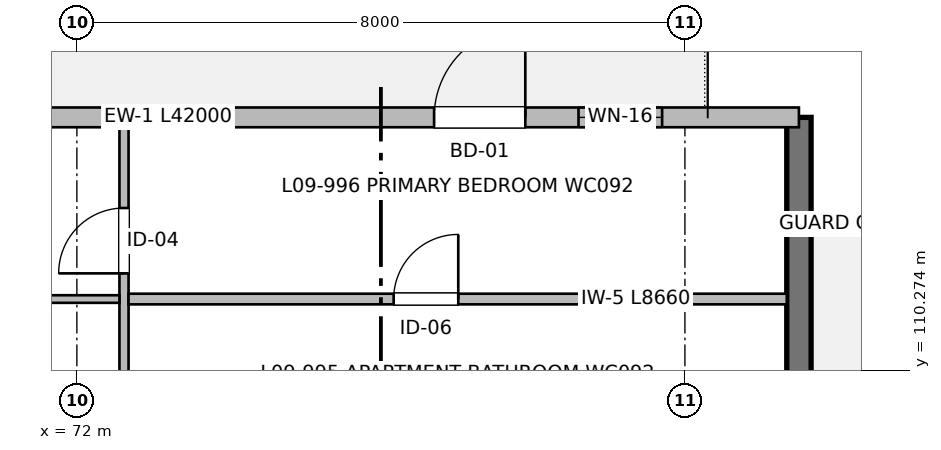
"""IFC4 building model, lengths in metres.
Left out: names, types, materials, properties, quantities, classifications, styles, units other than length and angle.
Written with IfcOpenShell. Run it as: python <this file> out.ifc"""

import sys

from ifc_helpers import new_model, si_unit, direction, frame, frame_2d, origin, place, context, subcontext, project, spatial, rectangle, extrude, element, fill, save


model = new_model("IFC4")
c1 = context("Model", 3, precision=1e-05, world=origin(), true_north=direction((0.0, 1.0)))
c2 = subcontext(c1, "Body", "Model", "MODEL_VIEW")
j1 = project(units=[si_unit("LENGTHUNIT", "METRE"), si_unit("PLANEANGLEUNIT", "RADIAN")], contexts=[c1])
p1 = place(None, origin())
s1 = spatial("IfcSite", under=j1, at=p1, CompositionType="ELEMENT")
p2 = place(p1, origin())
s2 = spatial("IfcBuilding", under=s1, at=p2, CompositionType="ELEMENT")
p3 = place(p2, frame((0.0, 0.0, 29.76)))
s3 = spatial("IfcBuildingStorey", under=s2, at=p3, CompositionType="ELEMENT", Elevation=29.76)
p4 = place(p3, frame((81.5, 113.6, 0.0), z_axis=(0.0, 0.0, 1.0), x_axis=(0.0, -1.0, 0.0)))
e1 = element("IfcWall", 1, at=p4, inside=s3, PredefinedType="SHEAR", context=c2, shape_type="SweptSolid", body=[
    extrude(rectangle(XDim=13.6, YDim=0.32, at=frame_2d((6.8, 0.0))), origin(), (0.0, 0.0, 1.0), 2.98),
])
p5 = place(p4, frame((4.9, 0.0, 0.0)))
e2 = element("IfcOpeningElement", 2, at=p5, cuts=e1, PredefinedType="OPENING", context=c2, shape_type="SweptSolid", body=[
    extrude(rectangle(XDim=1.2, YDim=2.2, at=frame_2d((0.6, 1.1))), frame((0.0, 0.17, 0.0), z_axis=(0.0, -1.0, 0.0), x_axis=(1.0, 0.0, 0.0)), (0.0, 0.0, 1.0), 0.34),
])
p6 = place(p4, frame((8.1, 0.0, 0.72)))
e3 = element("IfcOpeningElement", 3, at=p6, cuts=e1, PredefinedType="OPENING", context=c2, shape_type="SweptSolid", body=[
    extrude(rectangle(XDim=2.25, YDim=1.5, at=frame_2d((1.125, 0.75))), frame((0.0, 0.17, 0.0), z_axis=(0.0, -1.0, 0.0), x_axis=(1.0, 0.0, 0.0)), (0.0, 0.0, 1.0), 0.34),
])
p7 = place(p3, frame((39.5, 113.6, 0.0), z_axis=(0.0, 0.0, 1.0), x_axis=(1.0, 0.0, 0.0)))
e4 = element("IfcWall", 4, at=p7, inside=s3, PredefinedType="SOLIDWALL", context=c2, shape_type="SweptSolid", body=[
    extrude(rectangle(XDim=42.0, YDim=0.26, at=frame_2d((21.0, 0.0))), origin(), (0.0, 0.0, 1.0), 2.98),
])
p8 = place(p7, frame((3.6, 0.0, 0.0)))
e5 = element("IfcOpeningElement", 5, at=p8, cuts=e4, PredefinedType="OPENING", context=c2, shape_type="SweptSolid", body=[
    extrude(rectangle(XDim=1.2, YDim=2.2, at=frame_2d((0.6, 1.1))), frame((0.0, 0.14, 0.0), z_axis=(0.0, -1.0, 0.0), x_axis=(1.0, 0.0, 0.0)), (0.0, 0.0, 1.0), 0.28),
])
p9 = place(p7, frame((5.5, 0.0, 0.72)))
e6 = element("IfcOpeningElement", 6, at=p9, cuts=e4, PredefinedType="OPENING", context=c2, shape_type="SweptSolid", body=[
    extrude(rectangle(XDim=2.25, YDim=1.5, at=frame_2d((1.125, 0.75))), frame((0.0, 0.14, 0.0), z_axis=(0.0, -1.0, 0.0), x_axis=(1.0, 0.0, 0.0)), (0.0, 0.0, 1.0), 0.28),
])
p10 = place(p7, frame((12.45, 0.0, 0.72)))
e7 = element("IfcOpeningElement", 7, at=p10, cuts=e4, PredefinedType="OPENING", context=c2, shape_type="SweptSolid", body=[
    extrude(rectangle(XDim=2.0, YDim=1.5, at=frame_2d((1.0, 0.75))), frame((0.0, 0.14, 0.0), z_axis=(0.0, -1.0, 0.0), x_axis=(1.0, 0.0, 0.0)), (0.0, 0.0, 1.0), 0.28),
])
p11 = place(p7, frame((19.1, 0.0, 0.0)))
e8 = element("IfcOpeningElement", 8, at=p11, cuts=e4, PredefinedType="OPENING", context=c2, shape_type="SweptSolid", body=[
    extrude(rectangle(XDim=1.2, YDim=2.2, at=frame_2d((0.6, 1.1))), frame((0.0, 0.14, 0.0), z_axis=(0.0, -1.0, 0.0), x_axis=(1.0, 0.0, 0.0)), (0.0, 0.0, 1.0), 0.28),
])
p12 = place(p7, frame((22.3, 0.0, 0.9)))
e9 = element("IfcOpeningElement", 9, at=p12, cuts=e4, PredefinedType="OPENING", context=c2, shape_type="SweptSolid", body=[
    extrude(rectangle(XDim=1.2, YDim=1.05, at=frame_2d((0.6, 0.525))), frame((0.0, 0.14, 0.0), z_axis=(0.0, -1.0, 0.0), x_axis=(1.0, 0.0, 0.0)), (0.0, 0.0, 1.0), 0.28),
])
p13 = place(p7, frame((28.6, 0.0, 0.77)))
e10 = element("IfcOpeningElement", 10, at=p13, cuts=e4, PredefinedType="OPENING", context=c2, shape_type="SweptSolid", body=[
    extrude(rectangle(XDim=1.6, YDim=1.45, at=frame_2d((0.8, 0.725))), frame((0.0, 0.14, 0.0), z_axis=(0.0, -1.0, 0.0), x_axis=(1.0, 0.0, 0.0)), (0.0, 0.0, 1.0), 0.28),
])
p14 = place(p7, frame((37.2, 0.0, 0.0)))
e11 = element("IfcOpeningElement", 11, at=p14, cuts=e4, PredefinedType="OPENING", context=c2, shape_type="SweptSolid", body=[
    extrude(rectangle(XDim=1.2, YDim=2.2, at=frame_2d((0.6, 1.1))), frame((0.0, 0.14, 0.0), z_axis=(0.0, -1.0, 0.0), x_axis=(1.0, 0.0, 0.0)), (0.0, 0.0, 1.0), 0.28),
])
p15 = place(p7, frame((39.1, 0.0, 0.62)))
e12 = element("IfcOpeningElement", 12, at=p15, cuts=e4, PredefinedType="OPENING", context=c2, shape_type="SweptSolid", body=[
    extrude(rectangle(XDim=1.1, YDim=1.6, at=frame_2d((0.55, 0.8))), frame((0.0, 0.14, 0.0), z_axis=(0.0, -1.0, 0.0), x_axis=(1.0, 0.0, 0.0)), (0.0, 0.0, 1.0), 0.28),
])
p16 = place(p3, frame((72.62, 109.28, 0.0), z_axis=(0.0, 0.0, 1.0), x_axis=(0.0, 1.0, 0.0)))
e13 = element("IfcWall", 13, at=p16, inside=s3, PredefinedType="PARTITIONING", context=c2, shape_type="SweptSolid", body=[
    extrude(rectangle(XDim=4.19, YDim=0.12, at=frame_2d((2.095, 0.0))), origin(), (0.0, 0.0, 1.0), 2.935),
])
p17 = place(p16, frame((2.268, 0.0, 0.0)))
e14 = element("IfcOpeningElement", 14, at=p17, cuts=e13, PredefinedType="OPENING", context=c2, shape_type="SweptSolid", body=[
    extrude(rectangle(XDim=0.86, YDim=2.1, at=frame_2d((0.43, 1.05))), frame((0.0, 0.07, 0.0), z_axis=(0.0, -1.0, 0.0), x_axis=(1.0, 0.0, 0.0)), (0.0, 0.0, 1.0), 0.14),
])
p18 = place(p3, frame((72.68, 111.21, 0.0), z_axis=(0.0, 0.0, 1.0), x_axis=(1.0, 0.0, 0.0)))
e15 = element("IfcWall", 15, at=p18, inside=s3, PredefinedType="PARTITIONING", context=c2, shape_type="SweptSolid", body=[
    extrude(rectangle(XDim=8.66, YDim=0.14, at=frame_2d((4.33, 0.0))), origin(), (0.0, 0.0, 1.0), 2.935),
])
p19 = place(p18, frame((3.488, 0.0, 0.0)))
e16 = element("IfcOpeningElement", 16, at=p19, cuts=e15, PredefinedType="OPENING", context=c2, shape_type="SweptSolid", body=[
    extrude(rectangle(XDim=0.85, YDim=2.05, at=frame_2d((0.425, 1.025))), frame((0.0, 0.08, 0.0), z_axis=(0.0, -1.0, 0.0), x_axis=(1.0, 0.0, 0.0)), (0.0, 0.0, 1.0), 0.16),
])
p20 = place(p3, frame((60.59, 111.21, 0.0), z_axis=(0.0, 0.0, 1.0), x_axis=(1.0, 0.0, 0.0)))
e17 = element("IfcWall", 17, at=p20, inside=s3, PredefinedType="PARTITIONING", context=c2, shape_type="SweptSolid", body=[
    extrude(rectangle(XDim=11.97, YDim=0.1, at=frame_2d((5.985, 0.0))), origin(), (0.0, 0.0, 1.0), 2.935),
])
p21 = place(p20, frame((4.812, 0.0, 0.0)))
e18 = element("IfcOpeningElement", 18, at=p21, cuts=e17, PredefinedType="OPENING", context=c2, shape_type="SweptSolid", body=[
    extrude(rectangle(XDim=0.92, YDim=2.1, at=frame_2d((0.46, 1.05))), frame((0.0, 0.06, 0.0), z_axis=(0.0, -1.0, 0.0), x_axis=(1.0, 0.0, 0.0)), (0.0, 0.0, 1.0), 0.12),
])
p22 = place(p14, origin())
e19 = element("IfcDoor", 19, at=p22, inside=s3, OperationType="SINGLE_SWING_RIGHT", PredefinedType="DOOR", context=c2, shape_type="SweptSolid", body=[
    extrude(rectangle(XDim=1.2, YDim=2.2, at=frame_2d((0.6, 1.1))), frame((0.0, 0.025, 0.0), z_axis=(0.0, -1.0, 0.0), x_axis=(1.0, 0.0, 0.0)), (0.0, 0.0, 1.0), 0.05),
])
fill(e11, e19)
p23 = place(p15, origin())
e20 = element("IfcWindow", 20, at=p23, inside=s3, PartitioningType="SINGLE_PANEL", PredefinedType="WINDOW", context=c2, shape_type="SweptSolid", body=[
    extrude(rectangle(XDim=1.1, YDim=1.6, at=frame_2d((0.55, 0.8))), frame((0.0, 0.03, 0.0), z_axis=(0.0, -1.0, 0.0), x_axis=(1.0, 0.0, 0.0)), (0.0, 0.0, 1.0), 0.06),
])
fill(e12, e20)
p24 = place(p17, origin())
e21 = element("IfcDoor", 21, at=p24, inside=s3, OperationType="SINGLE_SWING_LEFT", PredefinedType="DOOR", context=c2, shape_type="SweptSolid", body=[
    extrude(rectangle(XDim=0.86, YDim=2.1, at=frame_2d((0.43, 1.05))), frame((0.0, 0.025, 0.0), z_axis=(0.0, -1.0, 0.0), x_axis=(1.0, 0.0, 0.0)), (0.0, 0.0, 1.0), 0.05),
])
fill(e14, e21)
p25 = place(p19, origin())
e22 = element("IfcDoor", 22, at=p25, inside=s3, OperationType="SINGLE_SWING_RIGHT", PredefinedType="DOOR", context=c2, shape_type="SweptSolid", body=[
    extrude(rectangle(XDim=0.85, YDim=2.05, at=frame_2d((0.425, 1.025))), frame((0.0, 0.025, 0.0), z_axis=(0.0, -1.0, 0.0), x_axis=(1.0, 0.0, 0.0)), (0.0, 0.0, 1.0), 0.05),
])
fill(e16, e22)
save(model, sys.argv[1])
